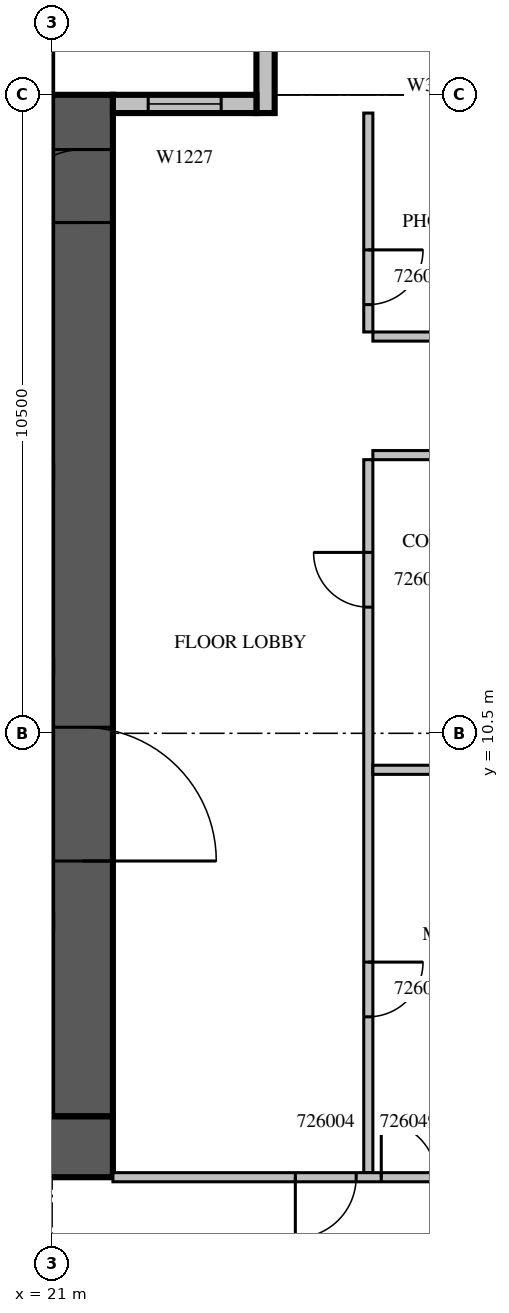
"""IFC4 building model, lengths in metres.
Left out: names, types, materials, properties, quantities, classifications, styles, units other than length and angle.
Written with IfcOpenShell. Run it as: python <this file> out.ifc"""

import sys

from ifc_helpers import new_model, si_unit, direction, frame, frame_2d, origin, place, context, subcontext, project, spatial, rectangle, extrude, source, transform, mapped, element, fill, save


model = new_model("IFC4")
c1 = context("Model", 3, precision=1e-05, world=origin(), true_north=direction((0.0, 1.0)))
c2 = subcontext(c1, "Body", "Model", "MODEL_VIEW")
j1 = project(units=[si_unit("LENGTHUNIT", "METRE"), si_unit("PLANEANGLEUNIT", "RADIAN")], contexts=[c1])
p1 = place(None, origin())
s1 = spatial("IfcSite", under=j1, at=p1, CompositionType="ELEMENT")
p2 = place(p1, origin())
s2 = spatial("IfcBuilding", under=s1, at=p2, CompositionType="ELEMENT")
p3 = place(p2, frame((0.0, 0.0, 120.3)))
s3 = spatial("IfcBuildingStorey", under=s2, at=p3, CompositionType="ELEMENT", Elevation=120.3)
m1 = source(origin(), c2, "Body", "SweptSolid", [
    extrude(rectangle(XDim=16.8, YDim=1.0, at=frame_2d((8.4, 0.0))), origin(), (0.0, 0.0, 1.0), 4.2),
])
p4 = place(p3, frame((21.5, 4.2, 0.0), z_axis=(0.0, 0.0, 1.0), x_axis=(0.0, 1.0, 0.0)))
e1 = element("IfcWall", 1, at=p4, inside=s3, PredefinedType="SHEAR", context=c2, shape_type="MappedRepresentation", body=[
    mapped(m1, transform((0.0, 0.0, 0.0), scale=1.0)),
])
m2 = source(origin(), c2, "Body", "SweptSolid", [
    extrude(rectangle(XDim=2.2, YDim=2.1, at=frame_2d((1.1, 1.05))), frame((0.0, 0.51, 0.0), z_axis=(0.0, -1.0, 0.0), x_axis=(1.0, 0.0, 0.0)), (0.0, 0.0, 1.0), 1.02),
])
p5 = place(p4, frame((4.2, 0.0, 0.0)))
e2 = element("IfcOpeningElement", 2, at=p5, cuts=e1, PredefinedType="OPENING", context=c2, shape_type="MappedRepresentation", body=[
    mapped(m2, transform((0.0, 0.0, 0.0), scale=1.0)),
])
m3 = source(origin(), c2, "Body", "SweptSolid", [
    extrude(rectangle(XDim=1.2, YDim=2.1, at=frame_2d((0.6, 1.05))), frame((0.0, 0.51, 0.0), z_axis=(0.0, -1.0, 0.0), x_axis=(1.0, 0.0, 0.0)), (0.0, 0.0, 1.0), 1.02),
])
p6 = place(p4, frame((14.7, 0.0, 0.0)))
e3 = element("IfcOpeningElement", 3, at=p6, cuts=e1, PredefinedType="OPENING", context=c2, shape_type="MappedRepresentation", body=[
    mapped(m3, transform((0.0, 0.0, 0.0), scale=1.0)),
])
m4 = source(origin(), c2, "Body", "SweptSolid", [
    extrude(rectangle(XDim=17.8, YDim=1.0, at=frame_2d((8.9, 0.0))), origin(), (0.0, 0.0, 1.0), 4.2),
])
p7 = place(p3, frame((4.2, 3.7, 0.0), z_axis=(0.0, 0.0, 1.0), x_axis=(1.0, 0.0, 0.0)))
e4 = element("IfcWall", 4, at=p7, inside=s3, PredefinedType="SHEAR", context=c2, shape_type="MappedRepresentation", body=[
    mapped(m4, transform((0.0, 0.0, 0.0), scale=1.0)),
])
m5 = source(origin(), c2, "Body", "SweptSolid", [
    extrude(rectangle(XDim=1.2, YDim=0.3, at=frame_2d((0.6, 0.0))), origin(), (0.0, 0.0, 1.0), 3.8),
])
p8 = place(p3, frame((24.51, 20.7, 0.0), z_axis=(0.0, 0.0, 1.0), x_axis=(0.0, 1.0, 0.0)))
e5 = element("IfcWall", 5, at=p8, inside=s3, PredefinedType="STANDARD", context=c2, shape_type="MappedRepresentation", body=[
    mapped(m5, transform((0.0, 0.0, 0.0), scale=1.0)),
])
m6 = source(origin(), c2, "Body", "SweptSolid", [
    extrude(rectangle(XDim=2.36, YDim=0.3, at=frame_2d((1.18, 0.0))), origin(), (0.0, 0.0, 1.0), 3.8),
])
p9 = place(p3, frame((24.36, 20.85, 0.0), z_axis=(0.0, 0.0, 1.0), x_axis=(-1.0, 0.0, 0.0)))
e6 = element("IfcWall", 6, at=p9, inside=s3, PredefinedType="STANDARD", context=c2, shape_type="MappedRepresentation", body=[
    mapped(m6, transform((0.0, 0.0, 0.0), scale=1.0)),
])
m7 = source(origin(), c2, "Body", "SweptSolid", [
    extrude(rectangle(XDim=1.2, YDim=2.7, at=frame_2d((0.6, 1.35))), frame((0.0, 0.16, 0.0), z_axis=(0.0, -1.0, 0.0), x_axis=(1.0, 0.0, 0.0)), (0.0, 0.0, 1.0), 0.32),
])
p10 = place(p9, frame((0.58, 0.0, 0.6)))
e7 = element("IfcOpeningElement", 7, at=p10, cuts=e6, PredefinedType="OPENING", context=c2, shape_type="MappedRepresentation", body=[
    mapped(m7, transform((0.0, 0.0, 0.0), scale=1.0)),
])
m8 = source(origin(), c2, "Body", "SweptSolid", [
    extrude(rectangle(XDim=11.725, YDim=0.15, at=frame_2d((5.862, 0.0))), origin(), (0.0, 0.0, 1.0), 3.8),
])
p11 = place(p3, frame((26.2, 15.0, 0.0), z_axis=(0.0, 0.0, 1.0), x_axis=(0.0, -1.0, 0.0)))
e8 = element("IfcWall", 8, at=p11, inside=s3, PredefinedType="PARTITIONING", context=c2, shape_type="MappedRepresentation", body=[
    mapped(m8, transform((0.0, 0.0, 0.0), scale=1.0)),
])
m9 = source(origin(), c2, "Body", "SweptSolid", [
    extrude(rectangle(XDim=0.9, YDim=2.1, at=frame_2d((0.45, 1.05))), frame((0.0, 0.085, 0.0), z_axis=(0.0, -1.0, 0.0), x_axis=(1.0, 0.0, 0.0)), (0.0, 0.0, 1.0), 0.17),
])
p12 = place(p11, frame((8.262, 0.0, 0.0)))
e9 = element("IfcOpeningElement", 9, at=p12, cuts=e8, PredefinedType="OPENING", context=c2, shape_type="MappedRepresentation", body=[
    mapped(m9, transform((0.0, 0.0, 0.0), scale=1.0)),
])
p13 = place(p11, frame((1.525, 0.0, 0.0)))
e10 = element("IfcOpeningElement", 10, at=p13, cuts=e8, PredefinedType="OPENING", context=c2, shape_type="MappedRepresentation", body=[
    mapped(m9, transform((0.0, 0.0, 0.0), scale=1.0)),
])
m10 = source(origin(), c2, "Body", "SweptSolid", [
    extrude(rectangle(XDim=3.6, YDim=0.15, at=frame_2d((1.8, 0.0))), origin(), (0.0, 0.0, 1.0), 3.8),
])
p14 = place(p3, frame((26.2, 20.7, 0.0), z_axis=(0.0, 0.0, 1.0), x_axis=(0.0, -1.0, 0.0)))
e11 = element("IfcWall", 11, at=p14, inside=s3, PredefinedType="PARTITIONING", context=c2, shape_type="MappedRepresentation", body=[
    mapped(m10, transform((0.0, 0.0, 0.0), scale=1.0)),
])
p15 = place(p14, frame((2.25, 0.0, 0.0)))
e12 = element("IfcOpeningElement", 12, at=p15, cuts=e11, PredefinedType="OPENING", context=c2, shape_type="MappedRepresentation", body=[
    mapped(m9, transform((0.0, 0.0, 0.0), scale=1.0)),
])
m11 = source(origin(), c2, "Body", "SweptSolid", [
    extrude(rectangle(XDim=3.05, YDim=0.15, at=frame_2d((1.525, 0.0))), origin(), (0.0, 0.0, 1.0), 3.8),
])
for number, where, z_axis, x_axis in (
    (13, (29.325, 9.9, 0.0), (0.0, 0.0, 1.0), (-1.0, 0.0, 0.0)),
    (14, (29.325, 15.075, 0.0), (0.0, 0.0, 1.0), (-1.0, 0.0, 0.0)),
    (15, (26.275, 17.025, 0.0), (0.0, 0.0, 1.0), (1.0, 0.0, 0.0)),
):
    element("IfcWall", number, at=place(p3, frame(where, z_axis=z_axis, x_axis=x_axis)), inside=s3, PredefinedType="PARTITIONING", context=c2, shape_type="MappedRepresentation", body=[
        mapped(m11, transform((0.0, 0.0, 0.0), scale=1.0)),
    ])
m12 = source(origin(), c2, "Body", "SweptSolid", [
    extrude(rectangle(XDim=7.325, YDim=0.15, at=frame_2d((3.663, 0.0))), origin(), (0.0, 0.0, 1.0), 3.8),
])
p16 = place(p3, frame((22.0, 3.2, 0.0), z_axis=(0.0, 0.0, 1.0), x_axis=(1.0, 0.0, 0.0)))
e16 = element("IfcWall", 16, at=p16, inside=s3, PredefinedType="PARTITIONING", context=c2, shape_type="MappedRepresentation", body=[
    mapped(m12, transform((0.0, 0.0, 0.0), scale=1.0)),
])
m13 = source(origin(), c2, "Body", "SweptSolid", [
    extrude(rectangle(XDim=1.0, YDim=2.1, at=frame_2d((0.5, 1.05))), frame((0.0, 0.085, 0.0), z_axis=(0.0, -1.0, 0.0), x_axis=(1.0, 0.0, 0.0)), (0.0, 0.0, 1.0), 0.17),
])
p17 = place(p16, frame((3.0, 0.0, 0.0)))
e17 = element("IfcOpeningElement", 17, at=p17, cuts=e16, PredefinedType="OPENING", context=c2, shape_type="MappedRepresentation", body=[
    mapped(m13, transform((0.0, 0.0, 0.0), scale=1.0)),
])
p18 = place(p16, frame((4.413, 0.0, 0.0)))
e18 = element("IfcOpeningElement", 18, at=p18, cuts=e16, PredefinedType="OPENING", context=c2, shape_type="MappedRepresentation", body=[
    mapped(m9, transform((0.0, 0.0, 0.0), scale=1.0)),
])
m14 = source(origin(), c2, "Body", "SweptSolid", [
    extrude(rectangle(XDim=1.2, YDim=2.7, at=frame_2d((0.6, 1.35))), frame((0.0, 0.03, 0.0), z_axis=(0.0, -1.0, 0.0), x_axis=(1.0, 0.0, 0.0)), (0.0, 0.0, 1.0), 0.06),
])
p19 = place(p10, origin())
e19 = element("IfcWindow", 19, at=p19, inside=s3, PartitioningType="SINGLE_PANEL", PredefinedType="WINDOW", context=c2, shape_type="MappedRepresentation", body=[
    mapped(m14, transform((0.0, 0.0, 0.0), scale=1.0)),
])
fill(e7, e19)
m15 = source(origin(), c2, "Body", "SweptSolid", [
    extrude(rectangle(XDim=2.2, YDim=2.1, at=frame_2d((1.1, 1.05))), frame((0.0, 0.025, 0.0), z_axis=(0.0, -1.0, 0.0), x_axis=(1.0, 0.0, 0.0)), (0.0, 0.0, 1.0), 0.05),
])
p20 = place(p5, origin())
e20 = element("IfcDoor", 20, at=p20, inside=s3, OperationType="DOUBLE_DOOR_SINGLE_SWING", PredefinedType="DOOR", context=c2, shape_type="MappedRepresentation", body=[
    mapped(m15, transform((0.0, 0.0, 0.0), scale=1.0)),
])
fill(e2, e20)
m16 = source(origin(), c2, "Body", "SweptSolid", [
    extrude(rectangle(XDim=1.2, YDim=2.1, at=frame_2d((0.6, 1.05))), frame((0.0, 0.025, 0.0), z_axis=(0.0, -1.0, 0.0), x_axis=(1.0, 0.0, 0.0)), (0.0, 0.0, 1.0), 0.05),
])
p21 = place(p6, origin())
e21 = element("IfcDoor", 21, at=p21, inside=s3, OperationType="SINGLE_SWING_LEFT", PredefinedType="DOOR", context=c2, shape_type="MappedRepresentation", body=[
    mapped(m16, transform((0.0, 0.0, 0.0), scale=1.0)),
])
fill(e3, e21)
m17 = source(origin(), c2, "Body", "SweptSolid", [
    extrude(rectangle(XDim=0.9, YDim=2.1, at=frame_2d((0.45, 1.05))), frame((0.0, 0.025, 0.0), z_axis=(0.0, -1.0, 0.0), x_axis=(1.0, 0.0, 0.0)), (0.0, 0.0, 1.0), 0.05),
])
p22 = place(p12, origin())
e22 = element("IfcDoor", 22, at=p22, inside=s3, OperationType="SINGLE_SWING_LEFT", PredefinedType="DOOR", context=c2, shape_type="MappedRepresentation", body=[
    mapped(m17, transform((0.0, 0.0, 0.0), scale=1.0)),
])
fill(e9, e22)
p23 = place(p13, origin())
e23 = element("IfcDoor", 23, at=p23, inside=s3, OperationType="SINGLE_SWING_RIGHT", PredefinedType="DOOR", context=c2, shape_type="MappedRepresentation", body=[
    mapped(m17, transform((0.0, 0.0, 0.0), scale=1.0)),
])
fill(e10, e23)
p24 = place(p15, origin())
e24 = element("IfcDoor", 24, at=p24, inside=s3, OperationType="SINGLE_SWING_LEFT", PredefinedType="DOOR", context=c2, shape_type="MappedRepresentation", body=[
    mapped(m17, transform((0.0, 0.0, 0.0), scale=1.0)),
])
fill(e12, e24)
m18 = source(origin(), c2, "Body", "SweptSolid", [
    extrude(rectangle(XDim=1.0, YDim=2.1, at=frame_2d((0.5, 1.05))), frame((0.0, 0.025, 0.0), z_axis=(0.0, -1.0, 0.0), x_axis=(1.0, 0.0, 0.0)), (0.0, 0.0, 1.0), 0.05),
])
p25 = place(p17, origin())
e25 = element("IfcDoor", 25, at=p25, inside=s3, OperationType="SINGLE_SWING_RIGHT", PredefinedType="DOOR", context=c2, shape_type="MappedRepresentation", body=[
    mapped(m18, transform((0.0, 0.0, 0.0), scale=1.0)),
])
fill(e17, e25)
p26 = place(p18, origin())
e26 = element("IfcDoor", 26, at=p26, inside=s3, OperationType="SINGLE_SWING_LEFT", PredefinedType="DOOR", context=c2, shape_type="MappedRepresentation", body=[
    mapped(m17, transform((0.0, 0.0, 0.0), scale=1.0)),
])
fill(e18, e26)
save(model, sys.argv[1])
